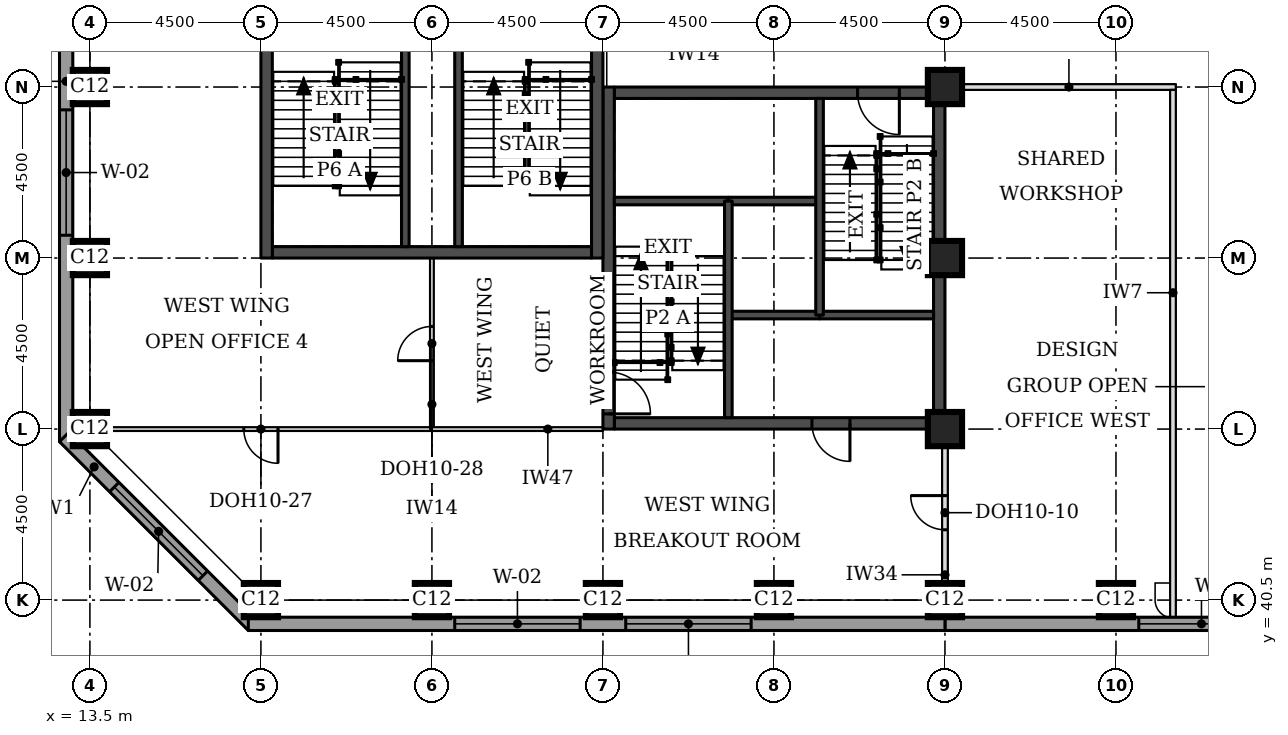
"""IFC4 building model, lengths in metres.
Left out: names, types, materials, properties, quantities, classifications, styles, units other than length and angle.
Written with IfcOpenShell. Run it as: python <this file> out.ifc"""

import sys

from ifc_helpers import new_model, si_unit, direction, frame, frame_2d, origin, origin_2d, place, context, subcontext, project, spatial, rectangle, extrude, element, fill, save


model = new_model("IFC4")
c1 = context("Model", 3, precision=1e-05, world=origin(), true_north=direction((0.0, 1.0)))
c2 = subcontext(c1, "Body", "Model", "MODEL_VIEW")
j1 = project(units=[si_unit("LENGTHUNIT", "METRE"), si_unit("PLANEANGLEUNIT", "RADIAN")], contexts=[c1])
p1 = place(None, origin())
s1 = spatial("IfcSite", under=j1, at=p1, CompositionType="ELEMENT")
p2 = place(p1, origin())
s2 = spatial("IfcBuilding", under=s1, at=p2, CompositionType="ELEMENT")
p3 = place(p2, frame((0.0, 0.0, 226.7)))
s3 = spatial("IfcBuildingStorey", under=s2, at=p3, CompositionType="ELEMENT", Elevation=226.7)
for number, where, z_axis, x_axis in (
    (1, (18.0, 40.5, 0.0), (0.0, 0.0, 1.0), (1.0, 0.0, 0.0)),
    (2, (22.5, 40.5, 0.0), (0.0, 0.0, 1.0), (1.0, 0.0, 0.0)),
    (3, (27.0, 40.5, 0.0), (0.0, 0.0, 1.0), (1.0, 0.0, 0.0)),
    (4, (31.5, 40.5, 0.0), (0.0, 0.0, 1.0), (1.0, 0.0, 0.0)),
    (5, (36.0, 40.5, 0.0), (0.0, 0.0, 1.0), (1.0, 0.0, 0.0)),
    (6, (40.5, 40.5, 0.0), (0.0, 0.0, 1.0), (1.0, 0.0, 0.0)),
    (7, (13.5, 45.0, 0.0), (0.0, 0.0, 1.0), (1.0, 0.0, 0.0)),
    (8, (36.0, 45.0, 0.0), (0.0, 0.0, 1.0), (1.0, 0.0, 0.0)),
    (9, (13.5, 49.5, 0.0), (0.0, 0.0, 1.0), (1.0, 0.0, 0.0)),
    (10, (36.0, 49.5, 0.0), (0.0, 0.0, 1.0), (1.0, 0.0, 0.0)),
    (11, (13.5, 54.0, 0.0), (0.0, 0.0, 1.0), (1.0, 0.0, 0.0)),
    (12, (36.0, 54.0, 0.0), (0.0, 0.0, 1.0), (1.0, 0.0, 0.0)),
):
    element("IfcColumn", number, at=place(p3, frame(where, z_axis=z_axis, x_axis=x_axis)), inside=s3, PredefinedType="COLUMN", context=c2, shape_type="SweptSolid", body=[
        extrude(rectangle(XDim=0.9, YDim=0.9, at=origin_2d()), origin(), (0.0, 0.0, 1.0), 3.7),
    ])
p4 = place(p3, frame((27.3, 45.15, 0.0), z_axis=(0.0, 0.0, 1.0), x_axis=(1.0, 0.0, 0.0)))
e13 = element("IfcWall", 13, at=p4, inside=s3, PredefinedType="SHEAR", context=c2, shape_type="SweptSolid", body=[
    extrude(rectangle(XDim=8.4, YDim=0.3, at=frame_2d((4.2, 0.0))), origin(), (0.0, 0.0, 1.0), 3.7),
])
p5 = place(p4, frame((5.2, 0.0, 0.0)))
e14 = element("IfcOpeningElement", 14, at=p5, cuts=e13, PredefinedType="OPENING", context=c2, shape_type="SweptSolid", body=[
    extrude(rectangle(XDim=1.0, YDim=2.1, at=frame_2d((0.5, 1.05))), frame((0.0, 0.16, 0.0), z_axis=(0.0, -1.0, 0.0), x_axis=(1.0, 0.0, 0.0)), (0.0, 0.0, 1.0), 0.32),
])
p6 = place(p3, frame((27.3, 53.85, 0.0), z_axis=(0.0, 0.0, 1.0), x_axis=(1.0, 0.0, 0.0)))
e15 = element("IfcWall", 15, at=p6, inside=s3, PredefinedType="SHEAR", context=c2, shape_type="SweptSolid", body=[
    extrude(rectangle(XDim=8.4, YDim=0.3, at=frame_2d((4.2, 0.0))), origin(), (0.0, 0.0, 1.0), 3.7),
])
p7 = place(p6, frame((6.4, 0.0, 0.0)))
e16 = element("IfcOpeningElement", 16, at=p7, cuts=e15, PredefinedType="OPENING", context=c2, shape_type="SweptSolid", body=[
    extrude(rectangle(XDim=1.1, YDim=2.1, at=frame_2d((0.55, 1.05))), frame((0.0, 0.16, 0.0), z_axis=(0.0, -1.0, 0.0), x_axis=(1.0, 0.0, 0.0)), (0.0, 0.0, 1.0), 0.32),
])
p8 = place(p3, frame((27.15, 45.0, 0.0), z_axis=(0.0, 0.0, 1.0), x_axis=(0.0, 1.0, 0.0)))
e17 = element("IfcWall", 17, at=p8, inside=s3, PredefinedType="SHEAR", context=c2, shape_type="SweptSolid", body=[
    extrude(rectangle(XDim=9.0, YDim=0.3, at=frame_2d((4.5, 0.0))), origin(), (0.0, 0.0, 1.0), 3.7),
])
p9 = place(p8, frame((0.4, 0.0, 0.0)))
e18 = element("IfcOpeningElement", 18, at=p9, cuts=e17, PredefinedType="OPENING", context=c2, shape_type="SweptSolid", body=[
    extrude(rectangle(XDim=1.1, YDim=2.1, at=frame_2d((0.55, 1.05))), frame((0.0, 0.16, 0.0), z_axis=(0.0, -1.0, 0.0), x_axis=(1.0, 0.0, 0.0)), (0.0, 0.0, 1.0), 0.32),
])
p10 = place(p3, frame((35.85, 45.0, 0.0), z_axis=(0.0, 0.0, 1.0), x_axis=(0.0, 1.0, 0.0)))
e19 = element("IfcWall", 19, at=p10, inside=s3, PredefinedType="SHEAR", context=c2, shape_type="SweptSolid", body=[
    extrude(rectangle(XDim=9.0, YDim=0.3, at=frame_2d((4.5, 0.0))), origin(), (0.0, 0.0, 1.0), 3.7),
])
p11 = place(p3, frame((18.3, 49.65, 0.0), z_axis=(0.0, 0.0, 1.0), x_axis=(1.0, 0.0, 0.0)))
e20 = element("IfcWall", 20, at=p11, inside=s3, PredefinedType="SHEAR", context=c2, shape_type="SweptSolid", body=[
    extrude(rectangle(XDim=8.4, YDim=0.3, at=frame_2d((4.2, 0.0))), origin(), (0.0, 0.0, 1.0), 3.7),
])
p12 = place(p3, frame((18.15, 49.5, 0.0), z_axis=(0.0, 0.0, 1.0), x_axis=(0.0, 1.0, 0.0)))
e21 = element("IfcWall", 21, at=p12, inside=s3, PredefinedType="SHEAR", context=c2, shape_type="SweptSolid", body=[
    extrude(rectangle(XDim=9.0, YDim=0.3, at=frame_2d((4.5, 0.0))), origin(), (0.0, 0.0, 1.0), 3.7),
])
p13 = place(p3, frame((26.85, 49.5, 0.0), z_axis=(0.0, 0.0, 1.0), x_axis=(0.0, 1.0, 0.0)))
e22 = element("IfcWall", 22, at=p13, inside=s3, PredefinedType="SHEAR", context=c2, shape_type="SweptSolid", body=[
    extrude(rectangle(XDim=9.0, YDim=0.3, at=frame_2d((4.5, 0.0))), origin(), (0.0, 0.0, 1.0), 3.7),
])
p14 = place(p13, frame((6.6, 0.0, 0.0)))
e23 = element("IfcOpeningElement", 23, at=p14, cuts=e22, PredefinedType="OPENING", context=c2, shape_type="SweptSolid", body=[
    extrude(rectangle(XDim=1.8, YDim=2.1, at=frame_2d((0.9, 1.05))), frame((0.0, 0.16, 0.0), z_axis=(0.0, -1.0, 0.0), x_axis=(1.0, 0.0, 0.0)), (0.0, 0.0, 1.0), 0.32),
])
p15 = place(p3, frame((36.0, 39.875, 0.0), z_axis=(0.0, 0.0, 1.0), x_axis=(1.0, 0.0, 0.0)))
e24 = element("IfcWall", 24, at=p15, inside=s3, PredefinedType="STANDARD", context=c2, shape_type="SweptSolid", body=[
    extrude(rectangle(XDim=36.331, YDim=0.35, at=frame_2d((18.166, 0.0))), origin(), (0.0, 0.0, 1.0), 3.525),
])
p16 = place(p15, frame((5.1, 0.0, 0.9)))
e25 = element("IfcOpeningElement", 25, at=p16, cuts=e24, PredefinedType="OPENING", context=c2, shape_type="SweptSolid", body=[
    extrude(rectangle(XDim=3.3, YDim=1.9, at=frame_2d((1.65, 0.95))), frame((0.0, 0.185, 0.0), z_axis=(0.0, -1.0, 0.0), x_axis=(1.0, 0.0, 0.0)), (0.0, 0.0, 1.0), 0.37),
])
p17 = place(p15, frame((9.6, 0.0, 0.9)))
e26 = element("IfcOpeningElement", 26, at=p17, cuts=e24, PredefinedType="OPENING", context=c2, shape_type="SweptSolid", body=[
    extrude(rectangle(XDim=3.3, YDim=1.9, at=frame_2d((1.65, 0.95))), frame((0.0, 0.185, 0.0), z_axis=(0.0, -1.0, 0.0), x_axis=(1.0, 0.0, 0.0)), (0.0, 0.0, 1.0), 0.37),
])
p18 = place(p15, frame((14.1, 0.0, 0.9)))
e27 = element("IfcOpeningElement", 27, at=p18, cuts=e24, PredefinedType="OPENING", context=c2, shape_type="SweptSolid", body=[
    extrude(rectangle(XDim=3.3, YDim=1.9, at=frame_2d((1.65, 0.95))), frame((0.0, 0.185, 0.0), z_axis=(0.0, -1.0, 0.0), x_axis=(1.0, 0.0, 0.0)), (0.0, 0.0, 1.0), 0.37),
])
p19 = place(p15, frame((18.6, 0.0, 0.9)))
e28 = element("IfcOpeningElement", 28, at=p19, cuts=e24, PredefinedType="OPENING", context=c2, shape_type="SweptSolid", body=[
    extrude(rectangle(XDim=3.3, YDim=1.9, at=frame_2d((1.65, 0.95))), frame((0.0, 0.185, 0.0), z_axis=(0.0, -1.0, 0.0), x_axis=(1.0, 0.0, 0.0)), (0.0, 0.0, 1.0), 0.37),
])
p20 = place(p15, frame((23.1, 0.0, 0.9)))
e29 = element("IfcOpeningElement", 29, at=p20, cuts=e24, PredefinedType="OPENING", context=c2, shape_type="SweptSolid", body=[
    extrude(rectangle(XDim=3.3, YDim=1.9, at=frame_2d((1.65, 0.95))), frame((0.0, 0.185, 0.0), z_axis=(0.0, -1.0, 0.0), x_axis=(1.0, 0.0, 0.0)), (0.0, 0.0, 1.0), 0.37),
])
p21 = place(p15, frame((27.6, 0.0, 0.9)))
e30 = element("IfcOpeningElement", 30, at=p21, cuts=e24, PredefinedType="OPENING", context=c2, shape_type="SweptSolid", body=[
    extrude(rectangle(XDim=3.3, YDim=1.9, at=frame_2d((1.65, 0.95))), frame((0.0, 0.185, 0.0), z_axis=(0.0, -1.0, 0.0), x_axis=(1.0, 0.0, 0.0)), (0.0, 0.0, 1.0), 0.37),
])
p22 = place(p3, frame((12.875, 58.831, 0.0), z_axis=(0.0, 0.0, 1.0), x_axis=(0.0, -1.0, 0.0)))
e31 = element("IfcWall", 31, at=p22, inside=s3, PredefinedType="STANDARD", context=c2, shape_type="SweptSolid", body=[
    extrude(rectangle(XDim=14.163, YDim=0.35, at=frame_2d((7.081, 0.0))), origin(), (0.0, 0.0, 1.0), 3.525),
])
p23 = place(p22, frame((5.431, 0.0, 0.9)))
e32 = element("IfcOpeningElement", 32, at=p23, cuts=e31, PredefinedType="OPENING", context=c2, shape_type="SweptSolid", body=[
    extrude(rectangle(XDim=3.3, YDim=1.9, at=frame_2d((1.65, 0.95))), frame((0.0, 0.185, 0.0), z_axis=(0.0, -1.0, 0.0), x_axis=(1.0, 0.0, 0.0)), (0.0, 0.0, 1.0), 0.37),
])
p24 = place(p3, frame((12.824, 44.792, 0.0), z_axis=(0.0, 0.0, 1.0), x_axis=(0.707106781187, -0.707106781187, 0.0)))
e33 = element("IfcWall", 33, at=p24, inside=s3, PredefinedType="STANDARD", context=c2, shape_type="SweptSolid", body=[
    extrude(rectangle(XDim=7.027, YDim=0.35, at=frame_2d((3.513, 0.0))), origin(), (0.0, 0.0, 1.0), 3.525),
])
p25 = place(p24, frame((1.863, 0.0, 0.9)))
e34 = element("IfcOpeningElement", 34, at=p25, cuts=e33, PredefinedType="OPENING", context=c2, shape_type="SweptSolid", body=[
    extrude(rectangle(XDim=3.3, YDim=1.9, at=frame_2d((1.65, 0.95))), frame((0.0, 0.185, 0.0), z_axis=(0.0, -1.0, 0.0), x_axis=(1.0, 0.0, 0.0)), (0.0, 0.0, 1.0), 0.37),
])
p26 = place(p3, frame((17.669, 39.875, 0.0), z_axis=(0.0, 0.0, 1.0), x_axis=(1.0, 0.0, 0.0)))
e35 = element("IfcWall", 35, at=p26, inside=s3, PredefinedType="STANDARD", context=c2, shape_type="SweptSolid", body=[
    extrude(rectangle(XDim=18.331, YDim=0.35, at=frame_2d((9.166, 0.0))), origin(), (0.0, 0.0, 1.0), 3.525),
])
p27 = place(p26, frame((5.431, 0.0, 0.9)))
e36 = element("IfcOpeningElement", 36, at=p27, cuts=e35, PredefinedType="OPENING", context=c2, shape_type="SweptSolid", body=[
    extrude(rectangle(XDim=3.3, YDim=1.9, at=frame_2d((1.65, 0.95))), frame((0.0, 0.185, 0.0), z_axis=(0.0, -1.0, 0.0), x_axis=(1.0, 0.0, 0.0)), (0.0, 0.0, 1.0), 0.37),
])
p28 = place(p26, frame((9.931, 0.0, 0.9)))
e37 = element("IfcOpeningElement", 37, at=p28, cuts=e35, PredefinedType="OPENING", context=c2, shape_type="SweptSolid", body=[
    extrude(rectangle(XDim=3.3, YDim=1.9, at=frame_2d((1.65, 0.95))), frame((0.0, 0.185, 0.0), z_axis=(0.0, -1.0, 0.0), x_axis=(1.0, 0.0, 0.0)), (0.0, 0.0, 1.0), 0.37),
])
p29 = place(p3, frame((36.45, 54.0, 0.0), z_axis=(0.0, 0.0, 1.0), x_axis=(1.0, 0.0, 0.0)))
e38 = element("IfcWall", 38, at=p29, inside=s3, PredefinedType="PARTITIONING", context=c2, shape_type="SweptSolid", body=[
    extrude(rectangle(XDim=5.625, YDim=0.15, at=frame_2d((2.812, 0.0))), origin(), (0.0, 0.0, 1.0), 3.55),
])
p30 = place(p3, frame((42.0, 40.05, 0.0), z_axis=(0.0, 0.0, 1.0), x_axis=(0.0, 1.0, 0.0)))
e39 = element("IfcWall", 39, at=p30, inside=s3, PredefinedType="PARTITIONING", context=c2, shape_type="SweptSolid", body=[
    extrude(rectangle(XDim=13.875, YDim=0.15, at=frame_2d((6.938, 0.0))), origin(), (0.0, 0.0, 1.0), 3.55),
])
p31 = place(p3, frame((36.0, 40.95, 0.0), z_axis=(0.0, 0.0, 1.0), x_axis=(0.0, 1.0, 0.0)))
e40 = element("IfcWall", 40, at=p31, inside=s3, PredefinedType="PARTITIONING", context=c2, shape_type="SweptSolid", body=[
    extrude(rectangle(XDim=3.63, YDim=0.15, at=frame_2d((1.815, 0.0))), origin(), (0.0, 0.0, 1.0), 2.8),
])
p32 = place(p31, frame((1.4, 0.0, 0.0)))
e41 = element("IfcOpeningElement", 41, at=p32, cuts=e40, PredefinedType="OPENING", context=c2, shape_type="SweptSolid", body=[
    extrude(rectangle(XDim=0.9, YDim=2.1, at=frame_2d((0.45, 1.05))), frame((0.0, 0.085, 0.0), z_axis=(0.0, -1.0, 0.0), x_axis=(1.0, 0.0, 0.0)), (0.0, 0.0, 1.0), 0.17),
])
p33 = place(p3, frame((22.5, 45.0, 0.0), z_axis=(0.0, 0.0, 1.0), x_axis=(-1.0, 0.0, 0.0)))
e42 = element("IfcWall", 42, at=p33, inside=s3, PredefinedType="PARTITIONING", context=c2, shape_type="SweptSolid", body=[
    extrude(rectangle(XDim=9.0, YDim=0.1, at=frame_2d((4.5, 0.0))), origin(), (0.0, 0.0, 1.0), 2.55),
])
p34 = place(p33, frame((4.05, 0.0, 0.0)))
e43 = element("IfcOpeningElement", 43, at=p34, cuts=e42, PredefinedType="OPENING", context=c2, shape_type="SweptSolid", body=[
    extrude(rectangle(XDim=0.9, YDim=2.1, at=frame_2d((0.45, 1.05))), frame((0.0, 0.06, 0.0), z_axis=(0.0, -1.0, 0.0), x_axis=(1.0, 0.0, 0.0)), (0.0, 0.0, 1.0), 0.12),
])
p35 = place(p3, frame((22.5, 49.5, 0.0), z_axis=(0.0, 0.0, 1.0), x_axis=(0.0, -1.0, 0.0)))
e44 = element("IfcWall", 44, at=p35, inside=s3, PredefinedType="PARTITIONING", context=c2, shape_type="SweptSolid", body=[
    extrude(rectangle(XDim=4.5, YDim=0.1, at=frame_2d((2.25, 0.0))), origin(), (0.0, 0.0, 1.0), 3.55),
])
p36 = place(p35, frame((1.8, 0.0, 0.0)))
e45 = element("IfcOpeningElement", 45, at=p36, cuts=e44, PredefinedType="OPENING", context=c2, shape_type="SweptSolid", body=[
    extrude(rectangle(XDim=0.9, YDim=2.1, at=frame_2d((0.45, 1.05))), frame((0.0, 0.06, 0.0), z_axis=(0.0, -1.0, 0.0), x_axis=(1.0, 0.0, 0.0)), (0.0, 0.0, 1.0), 0.12),
])
p37 = place(p3, frame((22.5, 45.0, 0.0), z_axis=(0.0, 0.0, 1.0), x_axis=(1.0, 0.0, 0.0)))
e46 = element("IfcWall", 46, at=p37, inside=s3, PredefinedType="PARTITIONING", context=c2, shape_type="SweptSolid", body=[
    extrude(rectangle(XDim=4.5, YDim=0.1, at=frame_2d((2.25, 0.0))), origin(), (0.0, 0.0, 1.0), 2.55),
])
p38 = place(p3, frame((30.3, 48.0, 0.0), z_axis=(0.0, 0.0, 1.0), x_axis=(1.0, 0.0, 0.0)))
e47 = element("IfcWall", 47, at=p38, inside=s3, PredefinedType="SOLIDWALL", context=c2, shape_type="SweptSolid", body=[
    extrude(rectangle(XDim=2.4, YDim=0.2, at=frame_2d((1.2, 0.0))), origin(), (0.0, 0.0, 1.0), 3.55),
])
p39 = place(p3, frame((32.7, 48.0, 0.0), z_axis=(0.0, 0.0, 1.0), x_axis=(1.0, 0.0, 0.0)))
e48 = element("IfcWall", 48, at=p39, inside=s3, PredefinedType="SOLIDWALL", context=c2, shape_type="SweptSolid", body=[
    extrude(rectangle(XDim=3.0, YDim=0.2, at=frame_2d((1.5, 0.0))), origin(), (0.0, 0.0, 1.0), 3.55),
])
p40 = place(p3, frame((30.3, 51.0, 0.0), z_axis=(0.0, 0.0, 1.0), x_axis=(1.0, 0.0, 0.0)))
e49 = element("IfcWall", 49, at=p40, inside=s3, PredefinedType="SOLIDWALL", context=c2, shape_type="SweptSolid", body=[
    extrude(rectangle(XDim=2.4, YDim=0.2, at=frame_2d((1.2, 0.0))), origin(), (0.0, 0.0, 1.0), 3.7),
])
p41 = place(p3, frame((27.3, 51.0, 0.0), z_axis=(0.0, 0.0, 1.0), x_axis=(1.0, 0.0, 0.0)))
e50 = element("IfcWall", 50, at=p41, inside=s3, PredefinedType="SOLIDWALL", context=c2, shape_type="SweptSolid", body=[
    extrude(rectangle(XDim=3.0, YDim=0.2, at=frame_2d((1.5, 0.0))), origin(), (0.0, 0.0, 1.0), 3.55),
])
for number, where, z_axis, x_axis in (
    (51, (30.3, 45.3, 0.0), (0.0, 0.0, 1.0), (0.0, 1.0, 0.0)),
    (52, (32.7, 48.0, 0.0), (0.0, 0.0, 1.0), (0.0, 1.0, 0.0)),
):
    element("IfcWall", number, at=place(p3, frame(where, z_axis=z_axis, x_axis=x_axis)), inside=s3, PredefinedType="SOLIDWALL", context=c2, shape_type="SweptSolid", body=[
        extrude(rectangle(XDim=5.7, YDim=0.2, at=frame_2d((2.85, 0.0))), origin(), (0.0, 0.0, 1.0), 3.55),
    ])
for number, where, z_axis, x_axis in (
    (53, (21.8, 49.8, 0.0), (0.0, 0.0, 1.0), (0.0, 1.0, 0.0)),
    (54, (23.2, 49.8, 0.0), (0.0, 0.0, 1.0), (0.0, 1.0, 0.0)),
):
    element("IfcWall", number, at=place(p3, frame(where, z_axis=z_axis, x_axis=x_axis)), inside=s3, PredefinedType="SOLIDWALL", context=c2, shape_type="SweptSolid", body=[
        extrude(rectangle(XDim=6.05, YDim=0.2, at=frame_2d((3.025, 0.0))), origin(), (0.0, 0.0, 1.0), 3.55),
    ])
p42 = place(p16, origin())
e55 = element("IfcWindow", 55, at=p42, inside=s3, PartitioningType="SINGLE_PANEL", PredefinedType="WINDOW", context=c2, shape_type="SweptSolid", body=[
    extrude(rectangle(XDim=3.3, YDim=1.9, at=frame_2d((1.65, 0.95))), frame((0.0, 0.085, 0.0), z_axis=(0.0, -1.0, 0.0), x_axis=(1.0, 0.0, 0.0)), (0.0, 0.0, 1.0), 0.06),
])
fill(e25, e55)
p43 = place(p23, origin())
e56 = element("IfcWindow", 56, at=p43, inside=s3, PartitioningType="SINGLE_PANEL", PredefinedType="WINDOW", context=c2, shape_type="SweptSolid", body=[
    extrude(rectangle(XDim=3.3, YDim=1.9, at=frame_2d((1.65, 0.95))), frame((0.0, 0.085, 0.0), z_axis=(0.0, -1.0, 0.0), x_axis=(1.0, 0.0, 0.0)), (0.0, 0.0, 1.0), 0.06),
])
fill(e32, e56)
p44 = place(p25, origin())
e57 = element("IfcWindow", 57, at=p44, inside=s3, PartitioningType="SINGLE_PANEL", PredefinedType="WINDOW", context=c2, shape_type="SweptSolid", body=[
    extrude(rectangle(XDim=3.3, YDim=1.9, at=frame_2d((1.65, 0.95))), frame((0.0, 0.085, 0.0), z_axis=(0.0, -1.0, 0.0), x_axis=(1.0, 0.0, 0.0)), (0.0, 0.0, 1.0), 0.06),
])
fill(e34, e57)
p45 = place(p27, origin())
e58 = element("IfcWindow", 58, at=p45, inside=s3, PartitioningType="SINGLE_PANEL", PredefinedType="WINDOW", context=c2, shape_type="SweptSolid", body=[
    extrude(rectangle(XDim=3.3, YDim=1.9, at=frame_2d((1.65, 0.95))), frame((0.0, 0.085, 0.0), z_axis=(0.0, -1.0, 0.0), x_axis=(1.0, 0.0, 0.0)), (0.0, 0.0, 1.0), 0.06),
])
fill(e36, e58)
p46 = place(p28, origin())
e59 = element("IfcWindow", 59, at=p46, inside=s3, PartitioningType="SINGLE_PANEL", PredefinedType="WINDOW", context=c2, shape_type="SweptSolid", body=[
    extrude(rectangle(XDim=3.3, YDim=1.9, at=frame_2d((1.65, 0.95))), frame((0.0, 0.085, 0.0), z_axis=(0.0, -1.0, 0.0), x_axis=(1.0, 0.0, 0.0)), (0.0, 0.0, 1.0), 0.06),
])
fill(e37, e59)
p47 = place(p32, origin())
e60 = element("IfcDoor", 60, at=p47, inside=s3, OperationType="SINGLE_SWING_RIGHT", PredefinedType="DOOR", context=c2, shape_type="SweptSolid", body=[
    extrude(rectangle(XDim=0.9, YDim=2.1, at=frame_2d((0.45, 1.05))), frame((0.0, 0.025, 0.0), z_axis=(0.0, -1.0, 0.0), x_axis=(1.0, 0.0, 0.0)), (0.0, 0.0, 1.0), 0.05),
])
fill(e41, e60)
p48 = place(p34, origin())
e61 = element("IfcDoor", 61, at=p48, inside=s3, OperationType="SINGLE_SWING_LEFT", PredefinedType="DOOR", context=c2, shape_type="SweptSolid", body=[
    extrude(rectangle(XDim=0.9, YDim=2.1, at=frame_2d((0.45, 1.05))), frame((0.0, 0.025, 0.0), z_axis=(0.0, -1.0, 0.0), x_axis=(1.0, 0.0, 0.0)), (0.0, 0.0, 1.0), 0.05),
])
fill(e43, e61)
p49 = place(p36, frame((0.9, 0.0, 0.0), z_axis=(0.0, 0.0, 1.0), x_axis=(-1.0, 0.0, 0.0)))
e62 = element("IfcDoor", 62, at=p49, inside=s3, OperationType="SINGLE_SWING_LEFT", PredefinedType="DOOR", context=c2, shape_type="SweptSolid", body=[
    extrude(rectangle(XDim=0.9, YDim=2.1, at=frame_2d((0.45, 1.05))), frame((0.0, 0.025, 0.0), z_axis=(0.0, -1.0, 0.0), x_axis=(1.0, 0.0, 0.0)), (0.0, 0.0, 1.0), 0.05),
])
fill(e45, e62)
p50 = place(p9, frame((1.1, 0.0, 0.0), z_axis=(0.0, 0.0, 1.0), x_axis=(-1.0, 0.0, 0.0)))
e63 = element("IfcDoor", 63, at=p50, inside=s3, OperationType="SINGLE_SWING_RIGHT", PredefinedType="DOOR", context=c2, shape_type="SweptSolid", body=[
    extrude(rectangle(XDim=1.1, YDim=2.1, at=frame_2d((0.55, 1.05))), frame((0.0, 0.025, 0.0), z_axis=(0.0, -1.0, 0.0), x_axis=(1.0, 0.0, 0.0)), (0.0, 0.0, 1.0), 0.05),
])
fill(e18, e63)
p51 = place(p7, frame((1.1, 0.0, 0.0), z_axis=(0.0, 0.0, 1.0), x_axis=(-1.0, 0.0, 0.0)))
e64 = element("IfcDoor", 64, at=p51, inside=s3, OperationType="SINGLE_SWING_LEFT", PredefinedType="DOOR", context=c2, shape_type="SweptSolid", body=[
    extrude(rectangle(XDim=1.1, YDim=2.1, at=frame_2d((0.55, 1.05))), frame((0.0, 0.025, 0.0), z_axis=(0.0, -1.0, 0.0), x_axis=(1.0, 0.0, 0.0)), (0.0, 0.0, 1.0), 0.05),
])
fill(e16, e64)
p52 = place(p5, frame((1.0, 0.0, 0.0), z_axis=(0.0, 0.0, 1.0), x_axis=(-1.0, 0.0, 0.0)))
e65 = element("IfcDoor", 65, at=p52, inside=s3, OperationType="SINGLE_SWING_LEFT", PredefinedType="DOOR", context=c2, shape_type="SweptSolid", body=[
    extrude(rectangle(XDim=1.0, YDim=2.1, at=frame_2d((0.5, 1.05))), frame((0.0, 0.025, 0.0), z_axis=(0.0, -1.0, 0.0), x_axis=(1.0, 0.0, 0.0)), (0.0, 0.0, 1.0), 0.05),
])
fill(e14, e65)
save(model, sys.argv[1])
